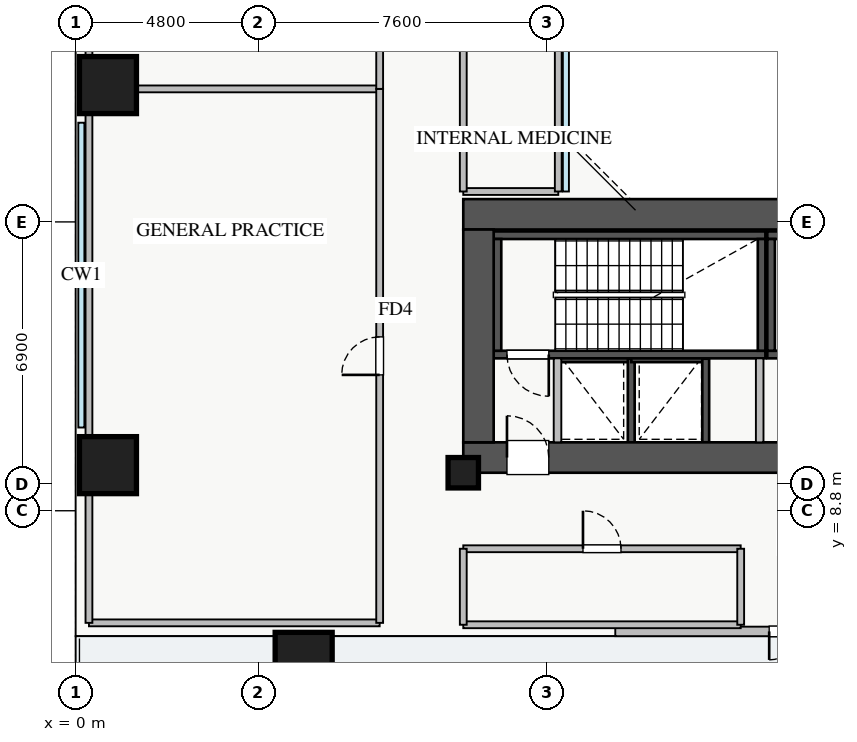
"""IFC4 building model, lengths in metres.
Left out: names, types, materials, properties, quantities, classifications, styles, units other than length and angle.
Written with IfcOpenShell. Run it as: python <this file> out.ifc"""

import sys

from ifc_helpers import new_model, si_unit, direction, frame, frame_2d, origin, origin_2d, place, context, subcontext, project, spatial, rectangle, extrude, source, transform, mapped, element, fill, save


model = new_model("IFC4")
c1 = context("Model", 3, precision=1e-05, world=origin(), true_north=direction((0.0, 1.0)))
c2 = subcontext(c1, "Body", "Model", "MODEL_VIEW")
j1 = project(units=[si_unit("LENGTHUNIT", "METRE"), si_unit("PLANEANGLEUNIT", "RADIAN")], contexts=[c1])
p1 = place(None, origin())
s1 = spatial("IfcSite", under=j1, at=p1, CompositionType="ELEMENT")
p2 = place(p1, origin())
s2 = spatial("IfcBuilding", under=s1, at=p2, CompositionType="ELEMENT")
p3 = place(p2, frame((0.0, 0.0, 13.8)))
s3 = spatial("IfcBuildingStorey", under=s2, at=p3, CompositionType="ELEMENT", Elevation=13.8)
p4 = place(p3, frame((12.68, 12.8, 0.0), z_axis=(0.0, 0.0, 1.0), x_axis=(1.0, 0.0, 0.0)))
e1 = element("IfcWall", 1, at=p4, inside=s3, PredefinedType="SHEAR", context=c2, shape_type="SweptSolid", body=[
    extrude(rectangle(XDim=1.94, YDim=0.18, at=frame_2d((0.97, 0.0))), origin(), (0.0, 0.0, 1.0), 4.15),
])
p5 = place(p3, frame((14.62, 10.6, 0.0), z_axis=(0.0, 0.0, 1.0), x_axis=(0.0, 1.0, 0.0)))
e2 = element("IfcWall", 2, at=p5, inside=s3, PredefinedType="SHEAR", context=c2, shape_type="SweptSolid", body=[
    extrude(rectangle(XDim=2.2, YDim=0.18, at=frame_2d((1.1, 0.0))), origin(), (0.0, 0.0, 1.0), 4.15),
])
p6 = place(p3, frame((14.62, 12.8, 0.0), z_axis=(0.0, 0.0, 1.0), x_axis=(1.0, 0.0, 0.0)))
e3 = element("IfcWall", 3, at=p6, inside=s3, PredefinedType="SHEAR", context=c2, shape_type="SweptSolid", body=[
    extrude(rectangle(XDim=1.96, YDim=0.18, at=frame_2d((0.98, 0.0))), origin(), (0.0, 0.0, 1.0), 4.15),
])
p7 = place(p3, frame((16.58, 10.6, 0.0), z_axis=(0.0, 0.0, 1.0), x_axis=(0.0, 1.0, 0.0)))
e4 = element("IfcWall", 4, at=p7, inside=s3, PredefinedType="SHEAR", context=c2, shape_type="SweptSolid", body=[
    extrude(rectangle(XDim=2.2, YDim=0.18, at=frame_2d((1.1, 0.0))), origin(), (0.0, 0.0, 1.0), 4.15),
])
p8 = place(p3, frame((11.0, 12.91, 0.0), z_axis=(0.0, 0.0, 1.0), x_axis=(1.0, 0.0, 0.0)))
e5 = element("IfcWall", 5, at=p8, inside=s3, PredefinedType="SHEAR", context=c2, shape_type="SweptSolid", body=[
    extrude(rectangle(XDim=7.15, YDim=0.2, at=frame_2d((3.575, 0.0))), origin(), (0.0, 0.0, 1.0), 4.4),
])
p9 = place(p8, frame((0.35, 0.0, 0.0)))
e6 = element("IfcOpeningElement", 6, at=p9, cuts=e5, PredefinedType="OPENING", context=c2, shape_type="SweptSolid", body=[
    extrude(rectangle(XDim=1.1, YDim=2.05, at=frame_2d((0.55, 1.025))), frame((0.0, 0.11, 0.0), z_axis=(0.0, -1.0, 0.0), x_axis=(1.0, 0.0, 0.0)), (0.0, 0.0, 1.0), 0.22),
])
p10 = place(p3, frame((11.0, 16.05, 0.0), z_axis=(0.0, 0.0, 1.0), x_axis=(1.0, 0.0, 0.0)))
e7 = element("IfcWall", 7, at=p10, inside=s3, PredefinedType="SHEAR", context=c2, shape_type="SweptSolid", body=[
    extrude(rectangle(XDim=7.15, YDim=0.2, at=frame_2d((3.575, 0.0))), origin(), (0.0, 0.0, 1.0), 4.4),
])
for number, where, z_axis, x_axis in (
    (8, (11.1, 13.01, 0.0), (0.0, 0.0, 1.0), (0.0, 1.0, 0.0)),
    (9, (18.05, 13.01, 0.0), (0.0, 0.0, 1.0), (0.0, 1.0, 0.0)),
):
    element("IfcWall", number, at=place(p3, frame(where, z_axis=z_axis, x_axis=x_axis)), inside=s3, PredefinedType="SHEAR", context=c2, shape_type="SweptSolid", body=[
        extrude(rectangle(XDim=2.94, YDim=0.2, at=frame_2d((1.47, 0.0))), origin(), (0.0, 0.0, 1.0), 4.4),
    ])
p11 = place(p3, frame((18.2, 12.91, 0.0), z_axis=(0.0, 0.0, 1.0), x_axis=(1.0, 0.0, 0.0)))
e10 = element("IfcWall", 10, at=p11, inside=s3, PredefinedType="SHEAR", context=c2, shape_type="SweptSolid", body=[
    extrude(rectangle(XDim=7.15, YDim=0.2, at=frame_2d((3.575, 0.0))), origin(), (0.0, 0.0, 1.0), 4.4),
])
p12 = place(p11, frame((0.35, 0.0, 0.0)))
e11 = element("IfcOpeningElement", 11, at=p12, cuts=e10, PredefinedType="OPENING", context=c2, shape_type="SweptSolid", body=[
    extrude(rectangle(XDim=1.1, YDim=2.05, at=frame_2d((0.55, 1.025))), frame((0.0, 0.11, 0.0), z_axis=(0.0, -1.0, 0.0), x_axis=(1.0, 0.0, 0.0)), (0.0, 0.0, 1.0), 0.22),
])
p13 = place(p3, frame((18.2, 16.05, 0.0), z_axis=(0.0, 0.0, 1.0), x_axis=(1.0, 0.0, 0.0)))
e12 = element("IfcWall", 12, at=p13, inside=s3, PredefinedType="SHEAR", context=c2, shape_type="SweptSolid", body=[
    extrude(rectangle(XDim=7.15, YDim=0.2, at=frame_2d((3.575, 0.0))), origin(), (0.0, 0.0, 1.0), 4.4),
])
p14 = place(p3, frame((18.3, 13.01, 0.0), z_axis=(0.0, 0.0, 1.0), x_axis=(0.0, 1.0, 0.0)))
e13 = element("IfcWall", 13, at=p14, inside=s3, PredefinedType="SHEAR", context=c2, shape_type="SweptSolid", body=[
    extrude(rectangle(XDim=2.94, YDim=0.2, at=frame_2d((1.47, 0.0))), origin(), (0.0, 0.0, 1.0), 4.4),
])
p15 = place(p3, frame((10.2, 10.2, 0.0), z_axis=(0.0, 0.0, 1.0), x_axis=(1.0, 0.0, 0.0)))
e14 = element("IfcWall", 14, at=p15, inside=s3, PredefinedType="SHEAR", context=c2, shape_type="SweptSolid", body=[
    extrude(rectangle(XDim=17.6, YDim=0.8, at=frame_2d((8.8, 0.0))), origin(), (0.0, 0.0, 1.0), 4.4),
])
p16 = place(p15, frame((1.15, 0.0, 0.0)))
e15 = element("IfcOpeningElement", 15, at=p16, cuts=e14, PredefinedType="OPENING", context=c2, shape_type="SweptSolid", body=[
    extrude(rectangle(XDim=1.1, YDim=2.05, at=frame_2d((0.55, 1.025))), frame((0.0, 0.41, 0.0), z_axis=(0.0, -1.0, 0.0), x_axis=(1.0, 0.0, 0.0)), (0.0, 0.0, 1.0), 0.82),
])
p17 = place(p15, frame((8.3, 0.0, 0.0)))
e16 = element("IfcOpeningElement", 16, at=p17, cuts=e14, PredefinedType="OPENING", context=c2, shape_type="SweptSolid", body=[
    extrude(rectangle(XDim=1.1, YDim=2.05, at=frame_2d((0.55, 1.025))), frame((0.0, 0.41, 0.0), z_axis=(0.0, -1.0, 0.0), x_axis=(1.0, 0.0, 0.0)), (0.0, 0.0, 1.0), 0.82),
])
p18 = place(p15, frame((10.05, 0.0, 0.0)))
e17 = element("IfcOpeningElement", 17, at=p18, cuts=e14, PredefinedType="OPENING", context=c2, shape_type="SweptSolid", body=[
    extrude(rectangle(XDim=1.1, YDim=2.05, at=frame_2d((0.55, 1.025))), frame((0.0, 0.41, 0.0), z_axis=(0.0, -1.0, 0.0), x_axis=(1.0, 0.0, 0.0)), (0.0, 0.0, 1.0), 0.82),
])
p19 = place(p15, frame((14.74, 0.0, 0.0)))
e18 = element("IfcOpeningElement", 18, at=p19, cuts=e14, PredefinedType="OPENING", context=c2, shape_type="SweptSolid", body=[
    extrude(rectangle(XDim=1.0, YDim=2.05, at=frame_2d((0.5, 1.025))), frame((0.0, 0.41, 0.0), z_axis=(0.0, -1.0, 0.0), x_axis=(1.0, 0.0, 0.0)), (0.0, 0.0, 1.0), 0.82),
])
p20 = place(p15, frame((11.945, 0.0, 0.0)))
e19 = element("IfcOpeningElement", 19, at=p20, cuts=e14, PredefinedType="OPENING", context=c2, shape_type="SweptSolid", body=[
    extrude(rectangle(XDim=1.0, YDim=2.05, at=frame_2d((0.5, 1.025))), frame((0.0, 0.41, 0.0), z_axis=(0.0, -1.0, 0.0), x_axis=(1.0, 0.0, 0.0)), (0.0, 0.0, 1.0), 0.82),
])
p21 = place(p15, frame((13.48, 0.0, 0.0)))
e20 = element("IfcOpeningElement", 20, at=p21, cuts=e14, PredefinedType="OPENING", context=c2, shape_type="SweptSolid", body=[
    extrude(rectangle(XDim=1.0, YDim=2.05, at=frame_2d((0.5, 1.025))), frame((0.0, 0.41, 0.0), z_axis=(0.0, -1.0, 0.0), x_axis=(1.0, 0.0, 0.0)), (0.0, 0.0, 1.0), 0.82),
])
p22 = place(p3, frame((10.2, 16.6, 0.0), z_axis=(0.0, 0.0, 1.0), x_axis=(1.0, 0.0, 0.0)))
e21 = element("IfcWall", 21, at=p22, inside=s3, PredefinedType="SHEAR", context=c2, shape_type="SweptSolid", body=[
    extrude(rectangle(XDim=17.6, YDim=0.8, at=frame_2d((8.8, 0.0))), origin(), (0.0, 0.0, 1.0), 4.4),
])
p23 = place(p3, frame((10.6, 10.6, 0.0), z_axis=(0.0, 0.0, 1.0), x_axis=(0.0, 1.0, 0.0)))
e22 = element("IfcWall", 22, at=p23, inside=s3, PredefinedType="SHEAR", context=c2, shape_type="SweptSolid", body=[
    extrude(rectangle(XDim=5.6, YDim=0.8, at=frame_2d((2.8, 0.0))), origin(), (0.0, 0.0, 1.0), 4.4),
])
m1 = source(origin(), c2, "Body", "SweptSolid", [
    extrude(rectangle(XDim=1.5, YDim=1.5, at=origin_2d()), origin(), (0.0, 0.0, 1.0), 4.4),
])
for number, where, z_axis, x_axis in (
    (23, (6.0, 4.85, 0.0), (0.0, 0.0, 1.0), (1.0, 0.0, 0.0)),
    (24, (0.85, 20.0, 0.0), (0.0, 0.0, 1.0), (1.0, 0.0, 0.0)),
    (25, (0.85, 10.0, 0.0), (0.0, 0.0, 1.0), (1.0, 0.0, 0.0)),
):
    element("IfcColumn", number, at=place(p3, frame(where, z_axis=z_axis, x_axis=x_axis)), inside=s3, PredefinedType="COLUMN", context=c2, shape_type="MappedRepresentation", body=[
        mapped(m1, transform((0.0, 0.0, 0.0), x_axis=(1.0, 0.0, 0.0), y_axis=(0.0, 1.0, 0.0), z_axis=(0.0, 0.0, 1.0), scale=1.0)),
    ])
m2 = source(origin(), c2, "Body", "SweptSolid", [
    extrude(rectangle(XDim=0.8, YDim=0.8, at=origin_2d()), origin(), (0.0, 0.0, 1.0), 4.4),
])
p24 = place(p3, frame((10.2, 9.8, 0.0), z_axis=(0.0, 0.0, 1.0), x_axis=(1.0, 0.0, 0.0)))
e26 = element("IfcColumn", 26, at=p24, inside=s3, PredefinedType="PILASTER", context=c2, shape_type="MappedRepresentation", body=[
    mapped(m2, transform((0.0, 0.0, 0.0), x_axis=(1.0, 0.0, 0.0), y_axis=(0.0, 1.0, 0.0), z_axis=(0.0, 0.0, 1.0), scale=1.0)),
])
p25 = place(p3, frame((14.2, 5.625, 0.0), z_axis=(0.0, 0.0, 1.0), x_axis=(1.0, 0.0, 0.0)))
e27 = element("IfcWall", 27, at=p25, inside=s3, PredefinedType="STANDARD", context=c2, shape_type="SweptSolid", body=[
    extrude(rectangle(XDim=9.6, YDim=0.25, at=frame_2d((4.8, 0.0))), origin(), (0.0, 0.0, 1.0), 3.69),
])
p26 = place(p25, frame((4.05, 0.0, 0.0)))
e28 = element("IfcOpeningElement", 28, at=p26, cuts=e27, PredefinedType="OPENING", context=c2, shape_type="SweptSolid", body=[
    extrude(rectangle(XDim=1.5, YDim=2.15, at=frame_2d((0.75, 1.075))), frame((0.0, 0.135, 0.0), z_axis=(0.0, -1.0, 0.0), x_axis=(1.0, 0.0, 0.0)), (0.0, 0.0, 1.0), 0.27),
])
for number, where, z_axis, x_axis in (
    (29, (12.68, 10.6, 0.0), (0.0, 0.0, 1.0), (0.0, 1.0, 0.0)),
    (30, (18.0, 10.6, 0.0), (0.0, 0.0, 1.0), (0.0, 1.0, 0.0)),
):
    element("IfcWall", number, at=place(p3, frame(where, z_axis=z_axis, x_axis=x_axis)), inside=s3, PredefinedType="PARTITIONING", context=c2, shape_type="SweptSolid", body=[
        extrude(rectangle(XDim=2.21, YDim=0.2, at=frame_2d((1.105, 0.0))), origin(), (0.0, 0.0, 1.0), 4.15),
    ])
for number, where, z_axis, x_axis in (
    (31, (0.35, 5.85, 0.0), (0.0, 0.0, 1.0), (1.0, 0.0, 0.0)),
    (32, (0.35, 19.9, 0.0), (0.0, 0.0, 1.0), (1.0, 0.0, 0.0)),
):
    element("IfcWall", number, at=place(p3, frame(where, z_axis=z_axis, x_axis=x_axis)), inside=s3, PredefinedType="PARTITIONING", context=c2, shape_type="SweptSolid", body=[
        extrude(rectangle(XDim=7.65, YDim=0.18, at=frame_2d((3.825, 0.0))), origin(), (0.0, 0.0, 1.0), 4.15),
    ])
p27 = place(p3, frame((0.35, 5.85, 0.0), z_axis=(0.0, 0.0, 1.0), x_axis=(0.0, 1.0, 0.0)))
e33 = element("IfcWall", 33, at=p27, inside=s3, PredefinedType="PARTITIONING", context=c2, shape_type="SweptSolid", body=[
    extrude(rectangle(XDim=14.05, YDim=0.18, at=frame_2d((7.025, 0.0))), origin(), (0.0, 0.0, 1.0), 4.15),
])
p28 = place(p3, frame((8.0, 5.85, 0.0), z_axis=(0.0, 0.0, 1.0), x_axis=(0.0, 1.0, 0.0)))
e34 = element("IfcWall", 34, at=p28, inside=s3, PredefinedType="PARTITIONING", context=c2, shape_type="SweptSolid", body=[
    extrude(rectangle(XDim=14.05, YDim=0.18, at=frame_2d((7.025, 0.0))), origin(), (0.0, 0.0, 1.0), 4.15),
])
p29 = place(p28, frame((6.525, 0.0, 0.0)))
e35 = element("IfcOpeningElement", 35, at=p29, cuts=e34, PredefinedType="OPENING", context=c2, shape_type="SweptSolid", body=[
    extrude(rectangle(XDim=1.0, YDim=2.05, at=frame_2d((0.5, 1.025))), frame((0.0, 0.1, 0.0), z_axis=(0.0, -1.0, 0.0), x_axis=(1.0, 0.0, 0.0)), (0.0, 0.0, 1.0), 0.2),
])
p30 = place(p3, frame((0.35, 19.9, 0.0), z_axis=(0.0, 0.0, 1.0), x_axis=(0.0, 1.0, 0.0)))
e36 = element("IfcWall", 36, at=p30, inside=s3, PredefinedType="PARTITIONING", context=c2, shape_type="SweptSolid", body=[
    extrude(rectangle(XDim=11.8, YDim=0.18, at=frame_2d((5.9, 0.0))), origin(), (0.0, 0.0, 1.0), 4.15),
])
p31 = place(p3, frame((8.0, 19.9, 0.0), z_axis=(0.0, 0.0, 1.0), x_axis=(0.0, 1.0, 0.0)))
e37 = element("IfcWall", 37, at=p31, inside=s3, PredefinedType="PARTITIONING", context=c2, shape_type="SweptSolid", body=[
    extrude(rectangle(XDim=11.8, YDim=0.18, at=frame_2d((5.9, 0.0))), origin(), (0.0, 0.0, 1.0), 4.15),
])
p32 = place(p31, frame((5.4, 0.0, 0.0)))
e38 = element("IfcOpeningElement", 38, at=p32, cuts=e37, PredefinedType="OPENING", context=c2, shape_type="SweptSolid", body=[
    extrude(rectangle(XDim=1.0, YDim=2.05, at=frame_2d((0.5, 1.025))), frame((0.0, 0.1, 0.0), z_axis=(0.0, -1.0, 0.0), x_axis=(1.0, 0.0, 0.0)), (0.0, 0.0, 1.0), 0.2),
])
p33 = place(p3, frame((10.2, 17.2, 0.0), z_axis=(0.0, 0.0, 1.0), x_axis=(1.0, 0.0, 0.0)))
e39 = element("IfcWall", 39, at=p33, inside=s3, PredefinedType="PARTITIONING", context=c2, shape_type="SweptSolid", body=[
    extrude(rectangle(XDim=2.5, YDim=0.18, at=frame_2d((1.25, 0.0))), origin(), (0.0, 0.0, 1.0), 4.15),
])
p34 = place(p3, frame((10.2, 17.2, 0.0), z_axis=(0.0, 0.0, 1.0), x_axis=(0.0, 1.0, 0.0)))
e40 = element("IfcWall", 40, at=p34, inside=s3, PredefinedType="PARTITIONING", context=c2, shape_type="SweptSolid", body=[
    extrude(rectangle(XDim=11.6, YDim=0.18, at=frame_2d((5.8, 0.0))), origin(), (0.0, 0.0, 1.0), 4.15),
])
p35 = place(p34, frame((5.3, 0.0, 0.0)))
e41 = element("IfcOpeningElement", 41, at=p35, cuts=e40, PredefinedType="OPENING", context=c2, shape_type="SweptSolid", body=[
    extrude(rectangle(XDim=1.0, YDim=2.05, at=frame_2d((0.5, 1.025))), frame((0.0, 0.1, 0.0), z_axis=(0.0, -1.0, 0.0), x_axis=(1.0, 0.0, 0.0)), (0.0, 0.0, 1.0), 0.2),
])
p36 = place(p3, frame((12.7, 17.2, 0.0), z_axis=(0.0, 0.0, 1.0), x_axis=(0.0, 1.0, 0.0)))
e42 = element("IfcWall", 42, at=p36, inside=s3, PredefinedType="PARTITIONING", context=c2, shape_type="SweptSolid", body=[
    extrude(rectangle(XDim=11.6, YDim=0.18, at=frame_2d((5.8, 0.0))), origin(), (0.0, 0.0, 1.0), 4.15),
])
p37 = place(p3, frame((10.2, 5.8, 0.0), z_axis=(0.0, 0.0, 1.0), x_axis=(1.0, 0.0, 0.0)))
e43 = element("IfcWall", 43, at=p37, inside=s3, PredefinedType="PARTITIONING", context=c2, shape_type="SweptSolid", body=[
    extrude(rectangle(XDim=7.3, YDim=0.18, at=frame_2d((3.65, 0.0))), origin(), (0.0, 0.0, 1.0), 4.15),
])
p38 = place(p3, frame((10.2, 7.8, 0.0), z_axis=(0.0, 0.0, 1.0), x_axis=(1.0, 0.0, 0.0)))
e44 = element("IfcWall", 44, at=p38, inside=s3, PredefinedType="PARTITIONING", context=c2, shape_type="SweptSolid", body=[
    extrude(rectangle(XDim=7.3, YDim=0.18, at=frame_2d((3.65, 0.0))), origin(), (0.0, 0.0, 1.0), 4.15),
])
p39 = place(p38, frame((3.15, 0.0, 0.0)))
e45 = element("IfcOpeningElement", 45, at=p39, cuts=e44, PredefinedType="OPENING", context=c2, shape_type="SweptSolid", body=[
    extrude(rectangle(XDim=1.0, YDim=2.05, at=frame_2d((0.5, 1.025))), frame((0.0, 0.1, 0.0), z_axis=(0.0, -1.0, 0.0), x_axis=(1.0, 0.0, 0.0)), (0.0, 0.0, 1.0), 0.2),
])
for number, where, z_axis, x_axis in (
    (46, (10.2, 5.8, 0.0), (0.0, 0.0, 1.0), (0.0, 1.0, 0.0)),
    (47, (17.5, 5.8, 0.0), (0.0, 0.0, 1.0), (0.0, 1.0, 0.0)),
):
    element("IfcWall", number, at=place(p3, frame(where, z_axis=z_axis, x_axis=x_axis)), inside=s3, PredefinedType="PARTITIONING", context=c2, shape_type="SweptSolid", body=[
        extrude(rectangle(XDim=2.0, YDim=0.18, at=frame_2d((1.0, 0.0))), origin(), (0.0, 0.0, 1.0), 4.15),
    ])
m3 = source(origin(), c2, "Body", "SweptSolid", [
    extrude(rectangle(XDim=1.5, YDim=2.15, at=frame_2d((0.75, 1.075))), frame((0.0, 0.025, 0.0), z_axis=(0.0, -1.0, 0.0), x_axis=(1.0, 0.0, 0.0)), (0.0, 0.0, 1.0), 0.05),
])
p40 = place(p26, frame((1.5, 0.0, 0.0), z_axis=(0.0, 0.0, 1.0), x_axis=(-1.0, 0.0, 0.0)))
e48 = element("IfcDoor", 48, at=p40, inside=s3, OperationType="DOUBLE_DOOR_SINGLE_SWING", PredefinedType="DOOR", context=c2, shape_type="MappedRepresentation", body=[
    mapped(m3, transform((0.0, 0.0, 0.0), x_axis=(1.0, 0.0, 0.0), y_axis=(0.0, 1.0, 0.0), z_axis=(0.0, 0.0, 1.0), scale=1.0)),
])
fill(e28, e48)
m4 = source(origin(), c2, "Body", "SweptSolid", [
    extrude(rectangle(XDim=1.1, YDim=2.05, at=frame_2d((0.55, 1.025))), frame((0.0, 0.025, 0.0), z_axis=(0.0, -1.0, 0.0), x_axis=(1.0, 0.0, 0.0)), (0.0, 0.0, 1.0), 0.05),
])
p41 = place(p16, origin())
e49 = element("IfcDoor", 49, at=p41, inside=s3, OperationType="SINGLE_SWING_LEFT", PredefinedType="DOOR", context=c2, shape_type="MappedRepresentation", body=[
    mapped(m4, transform((0.0, 0.0, 0.0), x_axis=(1.0, 0.0, 0.0), y_axis=(0.0, 1.0, 0.0), z_axis=(0.0, 0.0, 1.0), scale=1.0)),
])
fill(e15, e49)
p42 = place(p9, frame((1.1, 0.0, 0.0), z_axis=(0.0, 0.0, 1.0), x_axis=(-1.0, 0.0, 0.0)))
e50 = element("IfcDoor", 50, at=p42, inside=s3, OperationType="SINGLE_SWING_RIGHT", PredefinedType="DOOR", context=c2, shape_type="MappedRepresentation", body=[
    mapped(m4, transform((0.0, 0.0, 0.0), x_axis=(1.0, 0.0, 0.0), y_axis=(0.0, 1.0, 0.0), z_axis=(0.0, 0.0, 1.0), scale=1.0)),
])
fill(e6, e50)
m5 = source(origin(), c2, "Body", "SweptSolid", [
    extrude(rectangle(XDim=1.0, YDim=2.05, at=frame_2d((0.5, 1.025))), frame((0.0, 0.025, 0.0), z_axis=(0.0, -1.0, 0.0), x_axis=(1.0, 0.0, 0.0)), (0.0, 0.0, 1.0), 0.05),
])
p43 = place(p29, origin())
e51 = element("IfcDoor", 51, at=p43, inside=s3, OperationType="SINGLE_SWING_LEFT", PredefinedType="DOOR", context=c2, shape_type="MappedRepresentation", body=[
    mapped(m5, transform((0.0, 0.0, 0.0), x_axis=(1.0, 0.0, 0.0), y_axis=(0.0, 1.0, 0.0), z_axis=(0.0, 0.0, 1.0), scale=1.0)),
])
fill(e35, e51)
p44 = place(p39, origin())
e52 = element("IfcDoor", 52, at=p44, inside=s3, OperationType="SINGLE_SWING_LEFT", PredefinedType="DOOR", context=c2, shape_type="MappedRepresentation", body=[
    mapped(m5, transform((0.0, 0.0, 0.0), x_axis=(1.0, 0.0, 0.0), y_axis=(0.0, 1.0, 0.0), z_axis=(0.0, 0.0, 1.0), scale=1.0)),
])
fill(e45, e52)
save(model, sys.argv[1])
